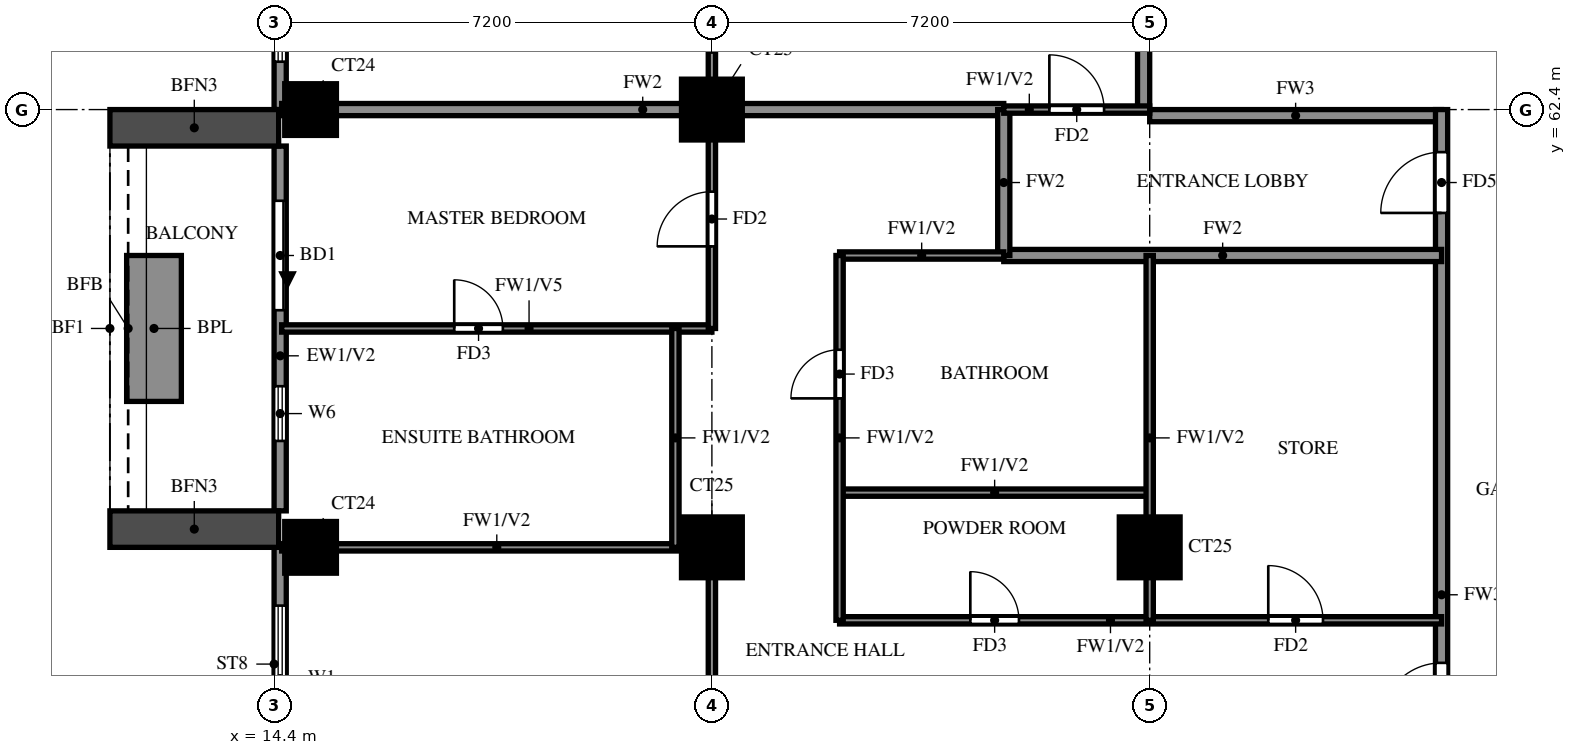
"""IFC4 building model, lengths in metres.
Left out: names, types, materials, properties, quantities, classifications, styles, units other than length and angle.
Written with IfcOpenShell. Run it as: python <this file> out.ifc"""

import sys

from ifc_helpers import new_model, si_unit, direction, frame, frame_2d, origin, origin_2d, place, context, subcontext, project, spatial, rectangle, extrude, source, transform, mapped, element, fill, save


model = new_model("IFC4")
c1 = context("Model", 3, precision=1e-05, world=origin(), true_north=direction((0.0, 1.0)))
c2 = subcontext(c1, "Body", "Model", "MODEL_VIEW")
j1 = project(units=[si_unit("LENGTHUNIT", "METRE"), si_unit("PLANEANGLEUNIT", "RADIAN")], contexts=[c1])
p1 = place(None, origin())
s1 = spatial("IfcSite", under=j1, at=p1, CompositionType="ELEMENT")
p2 = place(p1, origin())
s2 = spatial("IfcBuilding", under=s1, at=p2, CompositionType="ELEMENT")
p3 = place(p2, frame((0.0, 0.0, 143.0)))
s3 = spatial("IfcBuildingStorey", under=s2, at=p3, CompositionType="ELEMENT", Elevation=143.0)
m1 = source(origin(), c2, "Body", "SweptSolid", [
    extrude(rectangle(XDim=0.85, YDim=0.85, at=origin_2d()), origin(), (0.0, 0.0, 1.0), 3.2),
])
p4 = place(p3, frame((15.0, 55.2, 0.0), z_axis=(0.0, 0.0, 1.0), x_axis=(1.0, 0.0, 0.0)))
e1 = element("IfcColumn", 1, at=p4, inside=s3, PredefinedType="COLUMN", context=c2, shape_type="MappedRepresentation", body=[
    mapped(m1, transform((0.0, 0.0, 0.0))),
])
m2 = source(origin(), c2, "Body", "SweptSolid", [
    extrude(rectangle(XDim=1.0, YDim=1.0, at=origin_2d()), origin(), (0.0, 0.0, 1.0), 3.2),
])
for number, where, z_axis, x_axis in (
    (2, (21.6, 55.2, 0.0), (0.0, 0.0, 1.0), (1.0, 0.0, 0.0)),
    (3, (28.8, 55.2, 0.0), (0.0, 0.0, 1.0), (1.0, 0.0, 0.0)),
):
    element("IfcColumn", number, at=place(p3, frame(where, z_axis=z_axis, x_axis=x_axis)), inside=s3, PredefinedType="COLUMN", context=c2, shape_type="MappedRepresentation", body=[
        mapped(m2, transform((0.0, 0.0, 0.0))),
    ])
p5 = place(p3, frame((15.0, 62.4, 0.0), z_axis=(0.0, 0.0, 1.0), x_axis=(1.0, 0.0, 0.0)))
e4 = element("IfcColumn", 4, at=p5, inside=s3, PredefinedType="COLUMN", context=c2, shape_type="MappedRepresentation", body=[
    mapped(m1, transform((0.0, 0.0, 0.0))),
])
p6 = place(p3, frame((21.6, 62.4, 0.0), z_axis=(0.0, 0.0, 1.0), x_axis=(1.0, 0.0, 0.0)))
e5 = element("IfcColumn", 5, at=p6, inside=s3, PredefinedType="COLUMN", context=c2, shape_type="MappedRepresentation", body=[
    mapped(m2, transform((0.0, 0.0, 0.0))),
])
p7 = place(p3, frame((14.5, 76.6, 0.0), z_axis=(0.0, 0.0, 1.0), x_axis=(0.0, -1.0, 0.0)))
e6 = element("IfcWall", 6, at=p7, inside=s3, PredefinedType="SOLIDWALL", context=c2, shape_type="SweptSolid", body=[
    extrude(rectangle(XDim=14.2, YDim=0.2, at=frame_2d((7.1, 0.0))), origin(), (0.0, 0.0, 1.0), 3.2),
])
p8 = place(p7, frame((11.012, 0.0, 0.6)))
e7 = element("IfcOpeningElement", 7, at=p8, cuts=e6, PredefinedType="OPENING", context=c2, shape_type="SweptSolid", body=[
    extrude(rectangle(XDim=2.4, YDim=2.4, at=frame_2d((1.2, 1.2))), frame((0.0, 0.11, 0.0), z_axis=(0.0, -1.0, 0.0), x_axis=(1.0, 0.0, 0.0)), (0.0, 0.0, 1.0), 0.22),
])
p9 = place(p7, frame((7.788, 0.0, 0.6)))
e8 = element("IfcOpeningElement", 8, at=p9, cuts=e6, PredefinedType="OPENING", context=c2, shape_type="SweptSolid", body=[
    extrude(rectangle(XDim=2.4, YDim=2.4, at=frame_2d((1.2, 1.2))), frame((0.0, 0.11, 0.0), z_axis=(0.0, -1.0, 0.0), x_axis=(1.0, 0.0, 0.0)), (0.0, 0.0, 1.0), 0.22),
])
p10 = place(p7, frame((4.562, 0.0, 1.5)))
e9 = element("IfcOpeningElement", 9, at=p10, cuts=e6, PredefinedType="OPENING", context=c2, shape_type="SweptSolid", body=[
    extrude(rectangle(XDim=0.9, YDim=0.9, at=frame_2d((0.45, 0.45))), frame((0.0, 0.11, 0.0), z_axis=(0.0, -1.0, 0.0), x_axis=(1.0, 0.0, 0.0)), (0.0, 0.0, 1.0), 0.22),
])
p11 = place(p7, frame((0.6, 0.0, 0.6)))
e10 = element("IfcOpeningElement", 10, at=p11, cuts=e6, PredefinedType="OPENING", context=c2, shape_type="SweptSolid", body=[
    extrude(rectangle(XDim=2.4, YDim=2.4, at=frame_2d((1.2, 1.2))), frame((0.0, 0.11, 0.0), z_axis=(0.0, -1.0, 0.0), x_axis=(1.0, 0.0, 0.0)), (0.0, 0.0, 1.0), 0.22),
])
p12 = place(p3, frame((14.5, 61.8, 0.0), z_axis=(0.0, 0.0, 1.0), x_axis=(0.0, -1.0, 0.0)))
e11 = element("IfcWall", 11, at=p12, inside=s3, PredefinedType="SOLIDWALL", context=c2, shape_type="SweptSolid", body=[
    extrude(rectangle(XDim=6.0, YDim=0.2, at=frame_2d((3.0, 0.0))), origin(), (0.0, 0.0, 1.0), 3.2),
])
p13 = place(p12, frame((0.9, 0.0, 0.0)))
e12 = element("IfcOpeningElement", 12, at=p13, cuts=e11, PredefinedType="OPENING", context=c2, shape_type="SweptSolid", body=[
    extrude(rectangle(XDim=1.8, YDim=2.4, at=frame_2d((0.9, 1.2))), frame((0.0, 0.11, 0.0), z_axis=(0.0, -1.0, 0.0), x_axis=(1.0, 0.0, 0.0)), (0.0, 0.0, 1.0), 0.22),
])
p14 = place(p12, frame((3.95, 0.0, 1.5)))
e13 = element("IfcOpeningElement", 13, at=p14, cuts=e11, PredefinedType="OPENING", context=c2, shape_type="SweptSolid", body=[
    extrude(rectangle(XDim=0.9, YDim=0.9, at=frame_2d((0.45, 0.45))), frame((0.0, 0.11, 0.0), z_axis=(0.0, -1.0, 0.0), x_axis=(1.0, 0.0, 0.0)), (0.0, 0.0, 1.0), 0.22),
])
p15 = place(p3, frame((14.5, 55.2, 0.0), z_axis=(0.0, 0.0, 1.0), x_axis=(0.0, -1.0, 0.0)))
e14 = element("IfcWall", 14, at=p15, inside=s3, PredefinedType="SOLIDWALL", context=c2, shape_type="SweptSolid", body=[
    extrude(rectangle(XDim=12.0, YDim=0.2, at=frame_2d((6.0, 0.0))), origin(), (0.0, 0.0, 1.0), 3.2),
])
p16 = place(p15, frame((8.488, 0.0, 0.6)))
e15 = element("IfcOpeningElement", 15, at=p16, cuts=e14, PredefinedType="OPENING", context=c2, shape_type="SweptSolid", body=[
    extrude(rectangle(XDim=2.4, YDim=2.4, at=frame_2d((1.2, 1.2))), frame((0.0, 0.11, 0.0), z_axis=(0.0, -1.0, 0.0), x_axis=(1.0, 0.0, 0.0)), (0.0, 0.0, 1.0), 0.22),
])
p17 = place(p15, frame((0.958, 0.0, 0.6)))
e16 = element("IfcOpeningElement", 16, at=p17, cuts=e14, PredefinedType="OPENING", context=c2, shape_type="SweptSolid", body=[
    extrude(rectangle(XDim=2.4, YDim=2.4, at=frame_2d((1.2, 1.2))), frame((0.0, 0.11, 0.0), z_axis=(0.0, -1.0, 0.0), x_axis=(1.0, 0.0, 0.0)), (0.0, 0.0, 1.0), 0.22),
])
p18 = place(p15, frame((3.842, 0.0, 0.6)))
e17 = element("IfcOpeningElement", 17, at=p18, cuts=e14, PredefinedType="OPENING", context=c2, shape_type="SweptSolid", body=[
    extrude(rectangle(XDim=2.4, YDim=2.4, at=frame_2d((1.2, 1.2))), frame((0.0, 0.11, 0.0), z_axis=(0.0, -1.0, 0.0), x_axis=(1.0, 0.0, 0.0)), (0.0, 0.0, 1.0), 0.22),
])
for number, where, z_axis, x_axis in (
    (18, (14.475, 62.1, 0.0), (0.0, 0.0, 1.0), (-1.0, 0.0, 0.0)),
    (19, (14.475, 55.5, 0.0), (0.0, 0.0, 1.0), (-1.0, 0.0, 0.0)),
):
    element("IfcWall", number, at=place(p3, frame(where, z_axis=z_axis, x_axis=x_axis)), inside=s3, PredefinedType="SOLIDWALL", context=c2, shape_type="SweptSolid", body=[
        extrude(rectangle(XDim=2.775, YDim=0.6, at=frame_2d((1.388, 0.0))), origin(), (0.0, 0.0, 1.0), 2.85),
    ])
p19 = place(p3, frame((12.425, 60.0, 0.0), z_axis=(0.0, 0.0, 1.0), x_axis=(0.0, -1.0, 0.0)))
e20 = element("IfcWall", 20, at=p19, inside=s3, PredefinedType="SOLIDWALL", context=c2, shape_type="SweptSolid", body=[
    extrude(rectangle(XDim=2.4, YDim=0.9, at=frame_2d((1.2, 0.0))), origin(), (0.0, 0.0, 1.0), 0.9),
])
p20 = place(p3, frame((28.8, 62.3, 0.0), z_axis=(0.0, 0.0, 1.0), x_axis=(1.0, 0.0, 0.0)))
e21 = element("IfcWall", 21, at=p20, inside=s3, PredefinedType="SOLIDWALL", context=c2, shape_type="SweptSolid", body=[
    extrude(rectangle(XDim=4.8, YDim=0.2, at=frame_2d((2.4, 0.0))), origin(), (0.0, 0.0, 1.0), 3.2),
])
p21 = place(p3, frame((28.7, 62.4, 0.0), z_axis=(0.0, 0.0, 1.0), x_axis=(0.0, 1.0, 0.0)))
e22 = element("IfcWall", 22, at=p21, inside=s3, PredefinedType="SOLIDWALL", context=c2, shape_type="SweptSolid", body=[
    extrude(rectangle(XDim=15.6, YDim=0.2, at=frame_2d((7.8, 0.0))), origin(), (0.0, 0.0, 1.0), 3.2),
])
p22 = place(p3, frame((33.6, 45.6, 0.0), z_axis=(0.0, 0.0, 1.0), x_axis=(0.0, 1.0, 0.0)))
e23 = element("IfcWall", 23, at=p22, inside=s3, PredefinedType="SOLIDWALL", context=c2, shape_type="SweptSolid", body=[
    extrude(rectangle(XDim=16.8, YDim=0.2, at=frame_2d((8.4, 0.0))), origin(), (0.0, 0.0, 1.0), 3.2),
])
p23 = place(p22, frame((0.7, 0.0, 0.0)))
e24 = element("IfcOpeningElement", 24, at=p23, cuts=e23, PredefinedType="OPENING", context=c2, shape_type="SweptSolid", body=[
    extrude(rectangle(XDim=1.0, YDim=2.1, at=frame_2d((0.5, 1.05))), frame((0.0, 0.11, 0.0), z_axis=(0.0, -1.0, 0.0), x_axis=(1.0, 0.0, 0.0)), (0.0, 0.0, 1.0), 0.22),
])
p24 = place(p22, frame((6.7, 0.0, 0.0)))
e25 = element("IfcOpeningElement", 25, at=p24, cuts=e23, PredefinedType="OPENING", context=c2, shape_type="SweptSolid", body=[
    extrude(rectangle(XDim=1.0, YDim=2.1, at=frame_2d((0.5, 1.05))), frame((0.0, 0.11, 0.0), z_axis=(0.0, -1.0, 0.0), x_axis=(1.0, 0.0, 0.0)), (0.0, 0.0, 1.0), 0.22),
])
p25 = place(p22, frame((15.1, 0.0, 0.0)))
e26 = element("IfcOpeningElement", 26, at=p25, cuts=e23, PredefinedType="OPENING", context=c2, shape_type="SweptSolid", body=[
    extrude(rectangle(XDim=1.0, YDim=2.1, at=frame_2d((0.5, 1.05))), frame((0.0, 0.11, 0.0), z_axis=(0.0, -1.0, 0.0), x_axis=(1.0, 0.0, 0.0)), (0.0, 0.0, 1.0), 0.22),
])
p26 = place(p3, frame((26.4, 60.0, 0.0), z_axis=(0.0, 0.0, 1.0), x_axis=(1.0, 0.0, 0.0)))
e27 = element("IfcWall", 27, at=p26, inside=s3, PredefinedType="SOLIDWALL", context=c2, shape_type="SweptSolid", body=[
    extrude(rectangle(XDim=7.2, YDim=0.2, at=frame_2d((3.6, 0.0))), origin(), (0.0, 0.0, 1.0), 3.2),
])
p27 = place(p3, frame((14.525, 62.4, 0.0), z_axis=(0.0, 0.0, 1.0), x_axis=(1.0, 0.0, 0.0)))
e28 = element("IfcWall", 28, at=p27, inside=s3, PredefinedType="SOLIDWALL", context=c2, shape_type="SweptSolid", body=[
    extrude(rectangle(XDim=11.875, YDim=0.2, at=frame_2d((5.938, 0.0))), origin(), (0.0, 0.0, 1.0), 3.2),
])
p28 = place(p3, frame((26.4, 60.0, 0.0), z_axis=(0.0, 0.0, 1.0), x_axis=(0.0, 1.0, 0.0)))
e29 = element("IfcWall", 29, at=p28, inside=s3, PredefinedType="SOLIDWALL", context=c2, shape_type="SweptSolid", body=[
    extrude(rectangle(XDim=2.4, YDim=0.2, at=frame_2d((1.2, 0.0))), origin(), (0.0, 0.0, 1.0), 3.2),
])
p29 = place(p3, frame((23.7, 54.0, 0.0), z_axis=(0.0, 0.0, 1.0), x_axis=(1.0, 0.0, 0.0)))
e30 = element("IfcWall", 30, at=p29, inside=s3, PredefinedType="PARTITIONING", context=c2, shape_type="SweptSolid", body=[
    extrude(rectangle(XDim=9.9, YDim=0.12, at=frame_2d((4.95, 0.0))), origin(), (0.0, 0.0, 1.0), 3.2),
])
p30 = place(p29, frame((2.15, 0.0, 0.0)))
e31 = element("IfcOpeningElement", 31, at=p30, cuts=e30, PredefinedType="OPENING", context=c2, shape_type="SweptSolid", body=[
    extrude(rectangle(XDim=0.8, YDim=2.1, at=frame_2d((0.4, 1.05))), frame((0.0, 0.07, 0.0), z_axis=(0.0, -1.0, 0.0), x_axis=(1.0, 0.0, 0.0)), (0.0, 0.0, 1.0), 0.14),
])
p31 = place(p29, frame((7.05, 0.0, 0.0)))
e32 = element("IfcOpeningElement", 32, at=p31, cuts=e30, PredefinedType="OPENING", context=c2, shape_type="SweptSolid", body=[
    extrude(rectangle(XDim=0.9, YDim=2.1, at=frame_2d((0.45, 1.05))), frame((0.0, 0.07, 0.0), z_axis=(0.0, -1.0, 0.0), x_axis=(1.0, 0.0, 0.0)), (0.0, 0.0, 1.0), 0.14),
])
p32 = place(p3, frame((14.525, 55.2, 0.0), z_axis=(0.0, 0.0, 1.0), x_axis=(1.0, 0.0, 0.0)))
e33 = element("IfcWall", 33, at=p32, inside=s3, PredefinedType="PARTITIONING", context=c2, shape_type="SweptSolid", body=[
    extrude(rectangle(XDim=7.075, YDim=0.12, at=frame_2d((3.538, 0.0))), origin(), (0.0, 0.0, 1.0), 3.2),
])
p33 = place(p3, frame((23.7, 56.1, 0.0), z_axis=(0.0, 0.0, 1.0), x_axis=(1.0, 0.0, 0.0)))
e34 = element("IfcWall", 34, at=p33, inside=s3, PredefinedType="PARTITIONING", context=c2, shape_type="SweptSolid", body=[
    extrude(rectangle(XDim=5.1, YDim=0.12, at=frame_2d((2.55, 0.0))), origin(), (0.0, 0.0, 1.0), 3.2),
])
p34 = place(p3, frame((14.525, 58.8, 0.0), z_axis=(0.0, 0.0, 1.0), x_axis=(1.0, 0.0, 0.0)))
e35 = element("IfcWall", 35, at=p34, inside=s3, PredefinedType="PARTITIONING", context=c2, shape_type="SweptSolid", body=[
    extrude(rectangle(XDim=7.075, YDim=0.12, at=frame_2d((3.538, 0.0))), origin(), (0.0, 0.0, 1.0), 2.3),
])
p35 = place(p34, frame((2.837, 0.0, 0.0)))
e36 = element("IfcOpeningElement", 36, at=p35, cuts=e35, PredefinedType="OPENING", context=c2, shape_type="SweptSolid", body=[
    extrude(rectangle(XDim=0.8, YDim=2.1, at=frame_2d((0.4, 1.05))), frame((0.0, 0.07, 0.0), z_axis=(0.0, -1.0, 0.0), x_axis=(1.0, 0.0, 0.0)), (0.0, 0.0, 1.0), 0.14),
])
p36 = place(p3, frame((23.7, 60.0, 0.0), z_axis=(0.0, 0.0, 1.0), x_axis=(1.0, 0.0, 0.0)))
e37 = element("IfcWall", 37, at=p36, inside=s3, PredefinedType="PARTITIONING", context=c2, shape_type="SweptSolid", body=[
    extrude(rectangle(XDim=2.7, YDim=0.12, at=frame_2d((1.35, 0.0))), origin(), (0.0, 0.0, 1.0), 3.2),
])
p37 = place(p3, frame((26.4, 62.4, 0.0), z_axis=(0.0, 0.0, 1.0), x_axis=(1.0, 0.0, 0.0)))
e38 = element("IfcWall", 38, at=p37, inside=s3, PredefinedType="PARTITIONING", context=c2, shape_type="SweptSolid", body=[
    extrude(rectangle(XDim=2.4, YDim=0.12, at=frame_2d((1.2, 0.0))), origin(), (0.0, 0.0, 1.0), 3.2),
])
p38 = place(p37, frame((0.75, 0.0, 0.0)))
e39 = element("IfcOpeningElement", 39, at=p38, cuts=e38, PredefinedType="OPENING", context=c2, shape_type="SweptSolid", body=[
    extrude(rectangle(XDim=0.9, YDim=2.1, at=frame_2d((0.45, 1.05))), frame((0.0, 0.07, 0.0), z_axis=(0.0, -1.0, 0.0), x_axis=(1.0, 0.0, 0.0)), (0.0, 0.0, 1.0), 0.14),
])
p39 = place(p3, frame((21.0, 55.2, 0.0), z_axis=(0.0, 0.0, 1.0), x_axis=(0.0, 1.0, 0.0)))
e40 = element("IfcWall", 40, at=p39, inside=s3, PredefinedType="PARTITIONING", context=c2, shape_type="SweptSolid", body=[
    extrude(rectangle(XDim=3.6, YDim=0.12, at=frame_2d((1.8, 0.0))), origin(), (0.0, 0.0, 1.0), 3.2),
])
p40 = place(p3, frame((21.6, 48.0, 0.0), z_axis=(0.0, 0.0, 1.0), x_axis=(0.0, 1.0, 0.0)))
e41 = element("IfcWall", 41, at=p40, inside=s3, PredefinedType="PARTITIONING", context=c2, shape_type="SweptSolid", body=[
    extrude(rectangle(XDim=7.2, YDim=0.12, at=frame_2d((3.6, 0.0))), origin(), (0.0, 0.0, 1.0), 3.2),
])
p41 = place(p40, frame((2.85, 0.0, 0.0)))
e42 = element("IfcOpeningElement", 42, at=p41, cuts=e41, PredefinedType="OPENING", context=c2, shape_type="SweptSolid", body=[
    extrude(rectangle(XDim=1.5, YDim=2.1, at=frame_2d((0.75, 1.05))), frame((0.0, 0.07, 0.0), z_axis=(0.0, -1.0, 0.0), x_axis=(1.0, 0.0, 0.0)), (0.0, 0.0, 1.0), 0.14),
])
p42 = place(p3, frame((21.6, 58.8, 0.0), z_axis=(0.0, 0.0, 1.0), x_axis=(0.0, 1.0, 0.0)))
e43 = element("IfcWall", 43, at=p42, inside=s3, PredefinedType="PARTITIONING", context=c2, shape_type="SweptSolid", body=[
    extrude(rectangle(XDim=10.8, YDim=0.12, at=frame_2d((5.4, 0.0))), origin(), (0.0, 0.0, 1.0), 3.2),
])
p43 = place(p42, frame((1.35, 0.0, 0.0)))
e44 = element("IfcOpeningElement", 44, at=p43, cuts=e43, PredefinedType="OPENING", context=c2, shape_type="SweptSolid", body=[
    extrude(rectangle(XDim=0.9, YDim=2.1, at=frame_2d((0.45, 1.05))), frame((0.0, 0.07, 0.0), z_axis=(0.0, -1.0, 0.0), x_axis=(1.0, 0.0, 0.0)), (0.0, 0.0, 1.0), 0.14),
])
p44 = place(p42, frame((4.95, 0.0, 0.0)))
e45 = element("IfcOpeningElement", 45, at=p44, cuts=e43, PredefinedType="OPENING", context=c2, shape_type="SweptSolid", body=[
    extrude(rectangle(XDim=0.9, YDim=2.1, at=frame_2d((0.45, 1.05))), frame((0.0, 0.07, 0.0), z_axis=(0.0, -1.0, 0.0), x_axis=(1.0, 0.0, 0.0)), (0.0, 0.0, 1.0), 0.14),
])
p45 = place(p42, frame((8.55, 0.0, 0.0)))
e46 = element("IfcOpeningElement", 46, at=p45, cuts=e43, PredefinedType="OPENING", context=c2, shape_type="SweptSolid", body=[
    extrude(rectangle(XDim=0.9, YDim=2.1, at=frame_2d((0.45, 1.05))), frame((0.0, 0.07, 0.0), z_axis=(0.0, -1.0, 0.0), x_axis=(1.0, 0.0, 0.0)), (0.0, 0.0, 1.0), 0.14),
])
p46 = place(p3, frame((23.7, 54.0, 0.0), z_axis=(0.0, 0.0, 1.0), x_axis=(0.0, 1.0, 0.0)))
e47 = element("IfcWall", 47, at=p46, inside=s3, PredefinedType="PARTITIONING", context=c2, shape_type="SweptSolid", body=[
    extrude(rectangle(XDim=6.0, YDim=0.12, at=frame_2d((3.0, 0.0))), origin(), (0.0, 0.0, 1.0), 3.2),
])
p47 = place(p46, frame((3.65, 0.0, 0.0)))
e48 = element("IfcOpeningElement", 48, at=p47, cuts=e47, PredefinedType="OPENING", context=c2, shape_type="SweptSolid", body=[
    extrude(rectangle(XDim=0.8, YDim=2.1, at=frame_2d((0.4, 1.05))), frame((0.0, 0.07, 0.0), z_axis=(0.0, -1.0, 0.0), x_axis=(1.0, 0.0, 0.0)), (0.0, 0.0, 1.0), 0.14),
])
p48 = place(p3, frame((28.8, 54.0, 0.0), z_axis=(0.0, 0.0, 1.0), x_axis=(0.0, 1.0, 0.0)))
e49 = element("IfcWall", 49, at=p48, inside=s3, PredefinedType="PARTITIONING", context=c2, shape_type="SweptSolid", body=[
    extrude(rectangle(XDim=6.0, YDim=0.12, at=frame_2d((3.0, 0.0))), origin(), (0.0, 0.0, 1.0), 3.2),
])
p49 = place(p8, origin())
e50 = element("IfcWindow", 50, at=p49, inside=s3, PartitioningType="DOUBLE_PANEL_VERTICAL", PredefinedType="WINDOW", context=c2, shape_type="SweptSolid", body=[
    extrude(rectangle(XDim=2.4, YDim=2.4, at=frame_2d((1.2, 1.2))), frame((0.0, 0.03, 0.0), z_axis=(0.0, -1.0, 0.0), x_axis=(1.0, 0.0, 0.0)), (0.0, 0.0, 1.0), 0.06),
])
fill(e7, e50)
p50 = place(p13, origin())
e51 = element("IfcDoor", 51, at=p50, inside=s3, OperationType="DOUBLE_DOOR_SLIDING", PredefinedType="DOOR", context=c2, shape_type="SweptSolid", body=[
    extrude(rectangle(XDim=1.8, YDim=2.4, at=frame_2d((0.9, 1.2))), frame((0.0, 0.025, 0.0), z_axis=(0.0, -1.0, 0.0), x_axis=(1.0, 0.0, 0.0)), (0.0, 0.0, 1.0), 0.05),
])
fill(e12, e51)
p51 = place(p14, origin())
e52 = element("IfcWindow", 52, at=p51, inside=s3, PartitioningType="SINGLE_PANEL", PredefinedType="WINDOW", context=c2, shape_type="SweptSolid", body=[
    extrude(rectangle(XDim=0.9, YDim=0.9, at=frame_2d((0.45, 0.45))), frame((0.0, 0.03, 0.0), z_axis=(0.0, -1.0, 0.0), x_axis=(1.0, 0.0, 0.0)), (0.0, 0.0, 1.0), 0.06),
])
fill(e13, e52)
p52 = place(p17, origin())
e53 = element("IfcWindow", 53, at=p52, inside=s3, PartitioningType="DOUBLE_PANEL_VERTICAL", PredefinedType="WINDOW", context=c2, shape_type="SweptSolid", body=[
    extrude(rectangle(XDim=2.4, YDim=2.4, at=frame_2d((1.2, 1.2))), frame((0.0, 0.03, 0.0), z_axis=(0.0, -1.0, 0.0), x_axis=(1.0, 0.0, 0.0)), (0.0, 0.0, 1.0), 0.06),
])
fill(e16, e53)
p53 = place(p24, origin())
e54 = element("IfcDoor", 54, at=p53, inside=s3, OperationType="SINGLE_SWING_LEFT", PredefinedType="DOOR", context=c2, shape_type="SweptSolid", body=[
    extrude(rectangle(XDim=1.0, YDim=2.1, at=frame_2d((0.5, 1.05))), frame((0.0, 0.025, 0.0), z_axis=(0.0, -1.0, 0.0), x_axis=(1.0, 0.0, 0.0)), (0.0, 0.0, 1.0), 0.05),
])
fill(e25, e54)
p54 = place(p43, origin())
e55 = element("IfcDoor", 55, at=p54, inside=s3, OperationType="SINGLE_SWING_RIGHT", PredefinedType="DOOR", context=c2, shape_type="SweptSolid", body=[
    extrude(rectangle(XDim=0.9, YDim=2.1, at=frame_2d((0.45, 1.05))), frame((0.0, 0.025, 0.0), z_axis=(0.0, -1.0, 0.0), x_axis=(1.0, 0.0, 0.0)), (0.0, 0.0, 1.0), 0.05),
])
fill(e44, e55)
p55 = place(p35, origin())
e56 = element("IfcDoor", 56, at=p55, inside=s3, OperationType="SINGLE_SWING_LEFT", PredefinedType="DOOR", context=c2, shape_type="SweptSolid", body=[
    extrude(rectangle(XDim=0.8, YDim=2.1, at=frame_2d((0.4, 1.05))), frame((0.0, 0.025, 0.0), z_axis=(0.0, -1.0, 0.0), x_axis=(1.0, 0.0, 0.0)), (0.0, 0.0, 1.0), 0.05),
])
fill(e36, e56)
p56 = place(p30, origin())
e57 = element("IfcDoor", 57, at=p56, inside=s3, OperationType="SINGLE_SWING_RIGHT", PredefinedType="DOOR", context=c2, shape_type="SweptSolid", body=[
    extrude(rectangle(XDim=0.8, YDim=2.1, at=frame_2d((0.4, 1.05))), frame((0.0, 0.025, 0.0), z_axis=(0.0, -1.0, 0.0), x_axis=(1.0, 0.0, 0.0)), (0.0, 0.0, 1.0), 0.05),
])
fill(e31, e57)
p57 = place(p47, origin())
e58 = element("IfcDoor", 58, at=p57, inside=s3, OperationType="SINGLE_SWING_LEFT", PredefinedType="DOOR", context=c2, shape_type="SweptSolid", body=[
    extrude(rectangle(XDim=0.8, YDim=2.1, at=frame_2d((0.4, 1.05))), frame((0.0, 0.025, 0.0), z_axis=(0.0, -1.0, 0.0), x_axis=(1.0, 0.0, 0.0)), (0.0, 0.0, 1.0), 0.05),
])
fill(e48, e58)
p58 = place(p31, origin())
e59 = element("IfcDoor", 59, at=p58, inside=s3, OperationType="SINGLE_SWING_RIGHT", PredefinedType="DOOR", context=c2, shape_type="SweptSolid", body=[
    extrude(rectangle(XDim=0.9, YDim=2.1, at=frame_2d((0.45, 1.05))), frame((0.0, 0.025, 0.0), z_axis=(0.0, -1.0, 0.0), x_axis=(1.0, 0.0, 0.0)), (0.0, 0.0, 1.0), 0.05),
])
fill(e32, e59)
p59 = place(p38, origin())
e60 = element("IfcDoor", 60, at=p59, inside=s3, OperationType="SINGLE_SWING_LEFT", PredefinedType="DOOR", context=c2, shape_type="SweptSolid", body=[
    extrude(rectangle(XDim=0.9, YDim=2.1, at=frame_2d((0.45, 1.05))), frame((0.0, 0.025, 0.0), z_axis=(0.0, -1.0, 0.0), x_axis=(1.0, 0.0, 0.0)), (0.0, 0.0, 1.0), 0.05),
])
fill(e39, e60)
p60 = place(p25, origin())
e61 = element("IfcDoor", 61, at=p60, inside=s3, OperationType="SINGLE_SWING_LEFT", PredefinedType="DOOR", context=c2, shape_type="SweptSolid", body=[
    extrude(rectangle(XDim=1.0, YDim=2.1, at=frame_2d((0.5, 1.05))), frame((0.0, 0.025, 0.0), z_axis=(0.0, -1.0, 0.0), x_axis=(1.0, 0.0, 0.0)), (0.0, 0.0, 1.0), 0.05),
])
fill(e26, e61)
save(model, sys.argv[1])
